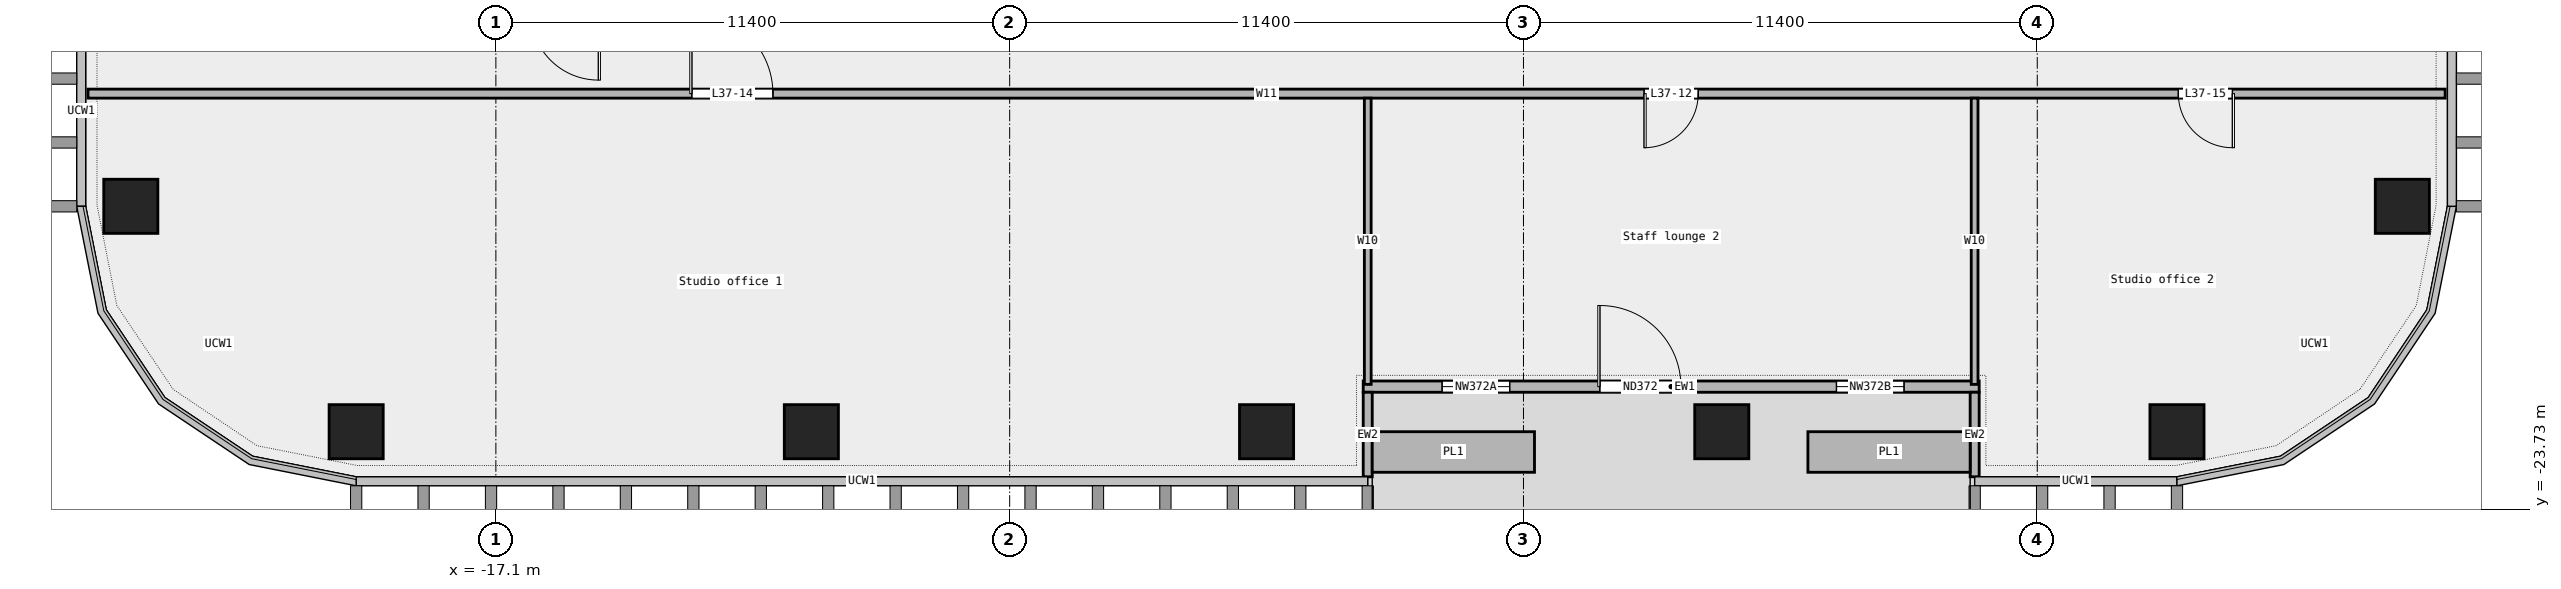
"""IFC4 building model, lengths in metres.
Left out: names, types, materials, properties, quantities, classifications, styles, units other than length and angle.
Written with IfcOpenShell. Run it as: python <this file> out.ifc"""

import sys

from ifc_helpers import new_model, si_unit, direction, frame, frame_2d, origin, origin_2d, place, context, subcontext, project, spatial, rectangle, extrude, element, fill, save


model = new_model("IFC4")
c1 = context("Model", 3, precision=1e-05, world=origin(), true_north=direction((0.0, 1.0)))
c2 = subcontext(c1, "Body", "Model", "MODEL_VIEW")
j1 = project(units=[si_unit("LENGTHUNIT", "METRE"), si_unit("PLANEANGLEUNIT", "RADIAN")], contexts=[c1])
p1 = place(None, origin())
s1 = spatial("IfcSite", under=j1, at=p1, CompositionType="ELEMENT")
p2 = place(p1, origin())
s2 = spatial("IfcBuilding", under=s1, at=p2, CompositionType="ELEMENT")
p3 = place(p2, frame((0.0, 0.0, 181.0)))
s3 = spatial("IfcBuildingStorey", under=s2, at=p3, CompositionType="ELEMENT", Elevation=181.0)
for number, where, z_axis, x_axis in (
    (1, (-20.2, -22.0, 0.0), (0.0, 0.0, 1.0), (1.0, 0.0, 0.0)),
    (2, (-10.1, -22.0, 0.0), (0.0, 0.0, 1.0), (1.0, 0.0, 0.0)),
    (3, (0.0, -22.0, 0.0), (0.0, 0.0, 1.0), (1.0, 0.0, 0.0)),
    (4, (10.1, -22.0, 0.0), (0.0, 0.0, 1.0), (1.0, 0.0, 0.0)),
    (5, (20.2, -22.0, 0.0), (0.0, 0.0, 1.0), (1.0, 0.0, 0.0)),
    (6, (25.2, -17.0, 0.0), (0.0, 0.0, 1.0), (1.0, 0.0, 0.0)),
    (7, (-25.2, -17.0, 0.0), (0.0, 0.0, 1.0), (1.0, 0.0, 0.0)),
):
    element("IfcColumn", number, at=place(p3, frame(where, z_axis=z_axis, x_axis=x_axis)), inside=s3, PredefinedType="COLUMN", context=c2, shape_type="SweptSolid", body=[
        extrude(rectangle(XDim=1.2, YDim=1.2, at=origin_2d()), origin(), (0.0, 0.0, 1.0), 3.6),
    ])
p4 = place(p3, frame((2.145, -21.0, 0.0), z_axis=(0.0, 0.0, 1.0), x_axis=(1.0, 0.0, 0.0)))
e8 = element("IfcWall", 8, at=p4, inside=s3, PredefinedType="STANDARD", context=c2, shape_type="SweptSolid", body=[
    extrude(rectangle(XDim=13.667, YDim=0.25, at=frame_2d((6.833, 0.0))), origin(), (0.0, 0.0, 1.0), 3.6),
])
p5 = place(p4, frame((1.75, 0.0, 0.45)))
e9 = element("IfcOpeningElement", 9, at=p5, cuts=e8, PredefinedType="OPENING", context=c2, shape_type="SweptSolid", body=[
    extrude(rectangle(XDim=1.5, YDim=2.4, at=frame_2d((0.75, 1.2))), frame((0.0, 0.137, 0.0), z_axis=(0.0, -1.0, 0.0), x_axis=(1.0, 0.0, 0.0)), (0.0, 0.0, 1.0), 0.274),
])
p6 = place(p4, frame((5.25, 0.0, 0.0)))
e10 = element("IfcOpeningElement", 10, at=p6, cuts=e8, PredefinedType="OPENING", context=c2, shape_type="SweptSolid", body=[
    extrude(rectangle(XDim=1.8, YDim=2.4, at=frame_2d((0.9, 1.2))), frame((0.0, 0.137, 0.0), z_axis=(0.0, -1.0, 0.0), x_axis=(1.0, 0.0, 0.0)), (0.0, 0.0, 1.0), 0.274),
])
p7 = place(p4, frame((10.5, 0.0, 0.45)))
e11 = element("IfcOpeningElement", 11, at=p7, cuts=e8, PredefinedType="OPENING", context=c2, shape_type="SweptSolid", body=[
    extrude(rectangle(XDim=1.5, YDim=2.4, at=frame_2d((0.75, 1.2))), frame((0.0, 0.137, 0.0), z_axis=(0.0, -1.0, 0.0), x_axis=(1.0, 0.0, 0.0)), (0.0, 0.0, 1.0), 0.274),
])
for number, where, z_axis, x_axis in (
    (12, (2.244, -23.0, 0.0), (0.0, 0.0, 1.0), (0.0, 1.0, 0.0)),
    (13, (15.711, -23.0, 0.0), (0.0, 0.0, 1.0), (0.0, 1.0, 0.0)),
):
    element("IfcWall", number, at=place(p3, frame(where, z_axis=z_axis, x_axis=x_axis)), inside=s3, PredefinedType="STANDARD", context=c2, shape_type="SweptSolid", body=[
        extrude(rectangle(XDim=1.875, YDim=0.2, at=frame_2d((0.938, 0.0))), origin(), (0.0, 0.0, 1.0), 3.6),
    ])
for number, where, z_axis, x_axis in (
    (14, (2.344, -22.45, 0.0), (0.0, 0.0, 1.0), (1.0, 0.0, 0.0)),
    (15, (12.011, -22.45, 0.0), (0.0, 0.0, 1.0), (1.0, 0.0, 0.0)),
):
    element("IfcWall", number, at=place(p3, frame(where, z_axis=z_axis, x_axis=x_axis)), inside=s3, PredefinedType="STANDARD", context=c2, shape_type="SweptSolid", body=[
        extrude(rectangle(XDim=3.6, YDim=0.9, at=frame_2d((1.8, 0.0))), origin(), (0.0, 0.0, 1.0), 0.7),
    ])
p8 = place(p3, frame((-26.15, -14.5, 0.0), z_axis=(0.0, 0.0, 1.0), x_axis=(1.0, 0.0, 0.0)))
e16 = element("IfcWall", 16, at=p8, inside=s3, PredefinedType="PARTITIONING", context=c2, shape_type="SweptSolid", body=[
    extrude(rectangle(XDim=52.3, YDim=0.2, at=frame_2d((26.15, 0.0))), origin(), (0.0, 0.0, 1.0), 3.6),
])
p9 = place(p8, frame((34.528, 0.0, 0.0)))
e17 = element("IfcOpeningElement", 17, at=p9, cuts=e16, PredefinedType="OPENING", context=c2, shape_type="SweptSolid", body=[
    extrude(rectangle(XDim=1.2, YDim=2.1, at=frame_2d((0.6, 1.05))), frame((0.0, 0.112, 0.0), z_axis=(0.0, -1.0, 0.0), x_axis=(1.0, 0.0, 0.0)), (0.0, 0.0, 1.0), 0.224),
])
p10 = place(p8, frame((13.397, 0.0, 0.0)))
e18 = element("IfcOpeningElement", 18, at=p10, cuts=e16, PredefinedType="OPENING", context=c2, shape_type="SweptSolid", body=[
    extrude(rectangle(XDim=1.8, YDim=2.1, at=frame_2d((0.9, 1.05))), frame((0.0, 0.112, 0.0), z_axis=(0.0, -1.0, 0.0), x_axis=(1.0, 0.0, 0.0)), (0.0, 0.0, 1.0), 0.224),
])
p11 = place(p8, frame((46.38, 0.0, 0.0)))
e19 = element("IfcOpeningElement", 19, at=p11, cuts=e16, PredefinedType="OPENING", context=c2, shape_type="SweptSolid", body=[
    extrude(rectangle(XDim=1.2, YDim=2.1, at=frame_2d((0.6, 1.05))), frame((0.0, 0.112, 0.0), z_axis=(0.0, -1.0, 0.0), x_axis=(1.0, 0.0, 0.0)), (0.0, 0.0, 1.0), 0.224),
])
for number, where, z_axis, x_axis in (
    (20, (2.245, -20.95, 0.0), (0.0, 0.0, 1.0), (0.0, 1.0, 0.0)),
    (21, (15.71, -20.95, 0.0), (0.0, 0.0, 1.0), (0.0, 1.0, 0.0)),
):
    element("IfcWall", number, at=place(p3, frame(where, z_axis=z_axis, x_axis=x_axis)), inside=s3, PredefinedType="PARTITIONING", context=c2, shape_type="SweptSolid", body=[
        extrude(rectangle(XDim=6.35, YDim=0.15, at=frame_2d((3.175, 0.0))), origin(), (0.0, 0.0, 1.0), 3.6),
    ])
p12 = place(p5, origin())
e22 = element("IfcWindow", 22, at=p12, inside=s3, PartitioningType="SINGLE_PANEL", PredefinedType="WINDOW", context=c2, shape_type="SweptSolid", body=[
    extrude(rectangle(XDim=1.5, YDim=2.4, at=frame_2d((0.75, 1.2))), frame((0.0, 0.03, 0.0), z_axis=(0.0, -1.0, 0.0), x_axis=(1.0, 0.0, 0.0)), (0.0, 0.0, 1.0), 0.06),
])
fill(e9, e22)
p13 = place(p6, origin())
e23 = element("IfcDoor", 23, at=p13, inside=s3, OperationType="DOUBLE_DOOR_SINGLE_SWING", PredefinedType="DOOR", context=c2, shape_type="SweptSolid", body=[
    extrude(rectangle(XDim=1.8, YDim=2.4, at=frame_2d((0.9, 1.2))), frame((0.0, 0.025, 0.0), z_axis=(0.0, -1.0, 0.0), x_axis=(1.0, 0.0, 0.0)), (0.0, 0.0, 1.0), 0.05),
])
fill(e10, e23)
p14 = place(p7, origin())
e24 = element("IfcWindow", 24, at=p14, inside=s3, PartitioningType="SINGLE_PANEL", PredefinedType="WINDOW", context=c2, shape_type="SweptSolid", body=[
    extrude(rectangle(XDim=1.5, YDim=2.4, at=frame_2d((0.75, 1.2))), frame((0.0, 0.03, 0.0), z_axis=(0.0, -1.0, 0.0), x_axis=(1.0, 0.0, 0.0)), (0.0, 0.0, 1.0), 0.06),
])
fill(e11, e24)
p15 = place(p9, origin())
e25 = element("IfcDoor", 25, at=p15, inside=s3, OperationType="SINGLE_SWING_RIGHT", PredefinedType="DOOR", context=c2, shape_type="SweptSolid", body=[
    extrude(rectangle(XDim=1.2, YDim=2.1, at=frame_2d((0.6, 1.05))), frame((0.0, 0.025, 0.0), z_axis=(0.0, -1.0, 0.0), x_axis=(1.0, 0.0, 0.0)), (0.0, 0.0, 1.0), 0.05),
])
fill(e17, e25)
p16 = place(p10, origin())
e26 = element("IfcDoor", 26, at=p16, inside=s3, OperationType="DOUBLE_DOOR_SINGLE_SWING", PredefinedType="DOOR", context=c2, shape_type="SweptSolid", body=[
    extrude(rectangle(XDim=1.8, YDim=2.1, at=frame_2d((0.9, 1.05))), frame((0.0, 0.025, 0.0), z_axis=(0.0, -1.0, 0.0), x_axis=(1.0, 0.0, 0.0)), (0.0, 0.0, 1.0), 0.05),
])
fill(e18, e26)
p17 = place(p11, origin())
e27 = element("IfcDoor", 27, at=p17, inside=s3, OperationType="SINGLE_SWING_LEFT", PredefinedType="DOOR", context=c2, shape_type="SweptSolid", body=[
    extrude(rectangle(XDim=1.2, YDim=2.1, at=frame_2d((0.6, 1.05))), frame((0.0, 0.025, 0.0), z_axis=(0.0, -1.0, 0.0), x_axis=(1.0, 0.0, 0.0)), (0.0, 0.0, 1.0), 0.05),
])
fill(e19, e27)
save(model, sys.argv[1])
